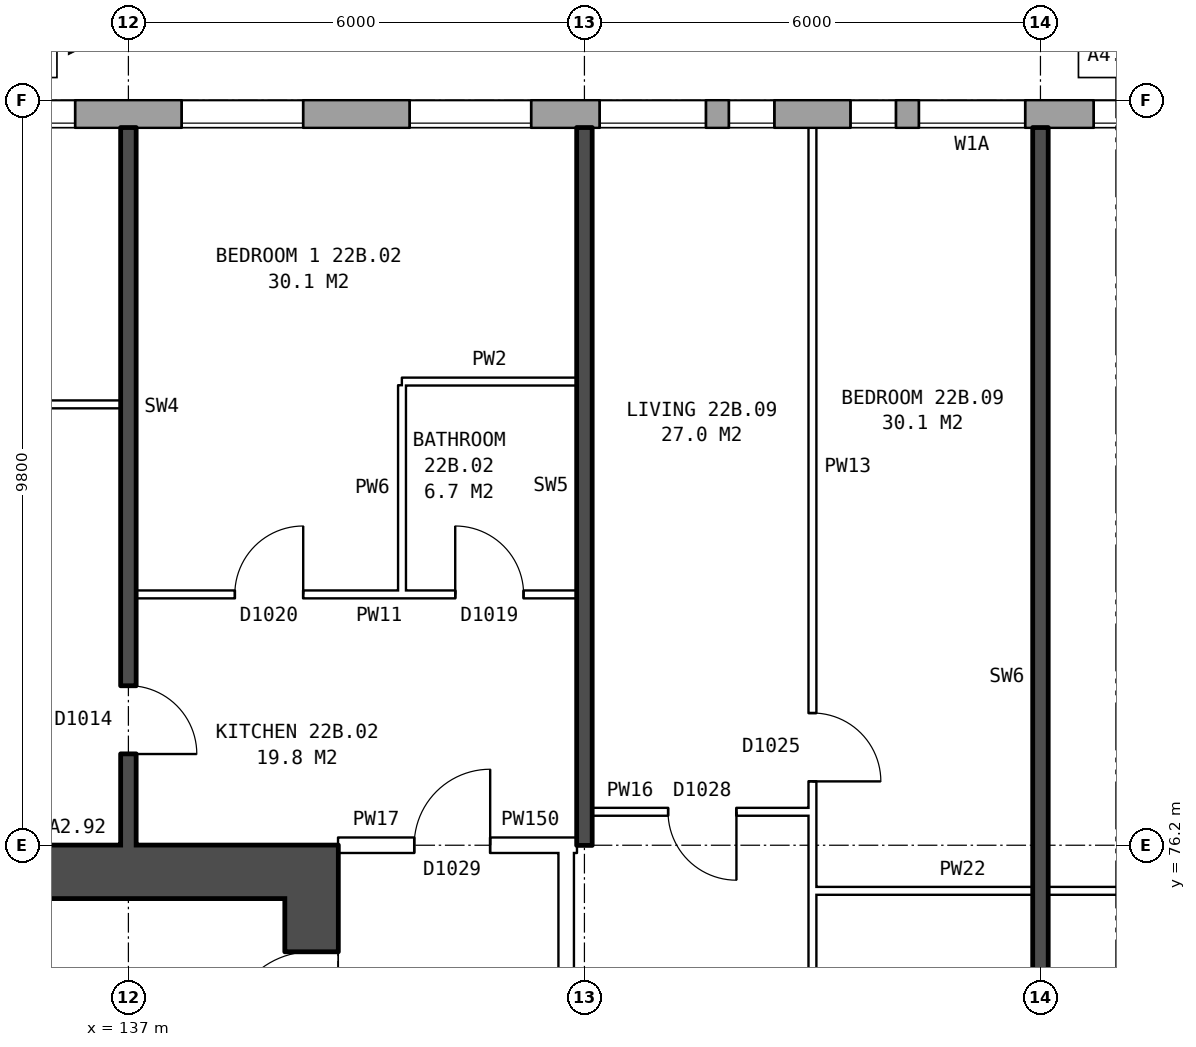
"""IFC4 building model, lengths in metres.
Left out: names, types, materials, properties, quantities, classifications, styles, units other than length and angle.
Written with IfcOpenShell. Run it as: python <this file> out.ifc"""

import sys

from ifc_helpers import new_model, si_unit, direction, frame, frame_2d, origin, place, context, subcontext, project, spatial, rectangle, extrude, element, fill, save


model = new_model("IFC4")
c1 = context("Model", 3, precision=1e-05, world=origin(), true_north=direction((0.0, 1.0)))
c2 = subcontext(c1, "Body", "Model", "MODEL_VIEW")
j1 = project(units=[si_unit("LENGTHUNIT", "METRE"), si_unit("PLANEANGLEUNIT", "RADIAN")], contexts=[c1])
p1 = place(None, origin())
s1 = spatial("IfcSite", under=j1, at=p1, CompositionType="ELEMENT")
p2 = place(p1, origin())
s2 = spatial("IfcBuilding", under=s1, at=p2, CompositionType="ELEMENT")
p3 = place(p2, frame((0.0, 0.0, 80.9)))
s3 = spatial("IfcBuildingStorey", under=s2, at=p3, CompositionType="ELEMENT", Elevation=80.9)
p4 = place(p3, frame((172.175, 85.82, 0.0), z_axis=(0.0, 0.0, 1.0), x_axis=(-1.0, 0.0, 0.0)))
e1 = element("IfcWall", 1, at=p4, inside=s3, PredefinedType="STANDARD", context=c2, shape_type="SweptSolid", body=[
    extrude(rectangle(XDim=38.101, YDim=0.36, at=frame_2d((19.05, 0.0))), origin(), (0.0, 0.0, 1.0), 2.85),
])
p5 = place(p4, frame((2.875, 0.0, 0.8)))
e2 = element("IfcOpeningElement", 2, at=p5, cuts=e1, PredefinedType="OPENING", context=c2, shape_type="SweptSolid", body=[
    extrude(rectangle(XDim=1.6, YDim=1.8, at=frame_2d((0.8, 0.9))), frame((0.0, 0.19, 0.0), z_axis=(0.0, -1.0, 0.0), x_axis=(1.0, 0.0, 0.0)), (0.0, 0.0, 1.0), 0.38),
])
p6 = place(p4, frame((5.875, 0.0, 0.8)))
e3 = element("IfcOpeningElement", 3, at=p6, cuts=e1, PredefinedType="OPENING", context=c2, shape_type="SweptSolid", body=[
    extrude(rectangle(XDim=1.6, YDim=1.8, at=frame_2d((0.8, 0.9))), frame((0.0, 0.19, 0.0), z_axis=(0.0, -1.0, 0.0), x_axis=(1.0, 0.0, 0.0)), (0.0, 0.0, 1.0), 0.38),
])
p7 = place(p4, frame((8.875, 0.0, 0.8)))
e4 = element("IfcOpeningElement", 4, at=p7, cuts=e1, PredefinedType="OPENING", context=c2, shape_type="SweptSolid", body=[
    extrude(rectangle(XDim=1.6, YDim=1.8, at=frame_2d((0.8, 0.9))), frame((0.0, 0.19, 0.0), z_axis=(0.0, -1.0, 0.0), x_axis=(1.0, 0.0, 0.0)), (0.0, 0.0, 1.0), 0.38),
])
p8 = place(p4, frame((12.575, 0.0, 0.8)))
e5 = element("IfcOpeningElement", 5, at=p8, cuts=e1, PredefinedType="OPENING", context=c2, shape_type="SweptSolid", body=[
    extrude(rectangle(XDim=0.6, YDim=0.9, at=frame_2d((0.3, 0.45))), frame((0.0, 0.19, 0.0), z_axis=(0.0, -1.0, 0.0), x_axis=(1.0, 0.0, 0.0)), (0.0, 0.0, 1.0), 0.38),
])
p9 = place(p4, frame((14.875, 0.0, 0.8)))
e6 = element("IfcOpeningElement", 6, at=p9, cuts=e1, PredefinedType="OPENING", context=c2, shape_type="SweptSolid", body=[
    extrude(rectangle(XDim=1.6, YDim=1.8, at=frame_2d((0.8, 0.9))), frame((0.0, 0.19, 0.0), z_axis=(0.0, -1.0, 0.0), x_axis=(1.0, 0.0, 0.0)), (0.0, 0.0, 1.0), 0.38),
])
p10 = place(p4, frame((17.875, 0.0, 0.8)))
e7 = element("IfcOpeningElement", 7, at=p10, cuts=e1, PredefinedType="OPENING", context=c2, shape_type="SweptSolid", body=[
    extrude(rectangle(XDim=1.6, YDim=1.8, at=frame_2d((0.8, 0.9))), frame((0.0, 0.19, 0.0), z_axis=(0.0, -1.0, 0.0), x_axis=(1.0, 0.0, 0.0)), (0.0, 0.0, 1.0), 0.38),
])
p11 = place(p4, frame((20.875, 0.0, 0.8)))
e8 = element("IfcOpeningElement", 8, at=p11, cuts=e1, PredefinedType="OPENING", context=c2, shape_type="SweptSolid", body=[
    extrude(rectangle(XDim=1.6, YDim=1.8, at=frame_2d((0.8, 0.9))), frame((0.0, 0.19, 0.0), z_axis=(0.0, -1.0, 0.0), x_axis=(1.0, 0.0, 0.0)), (0.0, 0.0, 1.0), 0.38),
])
p12 = place(p4, frame((23.375, 0.0, 0.65)))
e9 = element("IfcOpeningElement", 9, at=p12, cuts=e1, PredefinedType="OPENING", context=c2, shape_type="SweptSolid", body=[
    extrude(rectangle(XDim=1.4, YDim=1.8, at=frame_2d((0.7, 0.9))), frame((0.0, 0.19, 0.0), z_axis=(0.0, -1.0, 0.0), x_axis=(1.0, 0.0, 0.0)), (0.0, 0.0, 1.0), 0.38),
])
p13 = place(p4, frame((26.675, 0.0, 1.7)))
e10 = element("IfcOpeningElement", 10, at=p13, cuts=e1, PredefinedType="OPENING", context=c2, shape_type="SweptSolid", body=[
    extrude(rectangle(XDim=0.6, YDim=0.9, at=frame_2d((0.3, 0.45))), frame((0.0, 0.19, 0.0), z_axis=(0.0, -1.0, 0.0), x_axis=(1.0, 0.0, 0.0)), (0.0, 0.0, 1.0), 0.38),
])
p14 = place(p4, frame((29.875, 0.0, 0.8)))
e11 = element("IfcOpeningElement", 11, at=p14, cuts=e1, PredefinedType="OPENING", context=c2, shape_type="SweptSolid", body=[
    extrude(rectangle(XDim=1.6, YDim=1.8, at=frame_2d((0.8, 0.9))), frame((0.0, 0.19, 0.0), z_axis=(0.0, -1.0, 0.0), x_axis=(1.0, 0.0, 0.0)), (0.0, 0.0, 1.0), 0.38),
])
p15 = place(p4, frame((32.875, 0.0, 0.8)))
e12 = element("IfcOpeningElement", 12, at=p15, cuts=e1, PredefinedType="OPENING", context=c2, shape_type="SweptSolid", body=[
    extrude(rectangle(XDim=1.6, YDim=1.8, at=frame_2d((0.8, 0.9))), frame((0.0, 0.19, 0.0), z_axis=(0.0, -1.0, 0.0), x_axis=(1.0, 0.0, 0.0)), (0.0, 0.0, 1.0), 0.38),
])
p16 = place(p4, frame((35.875, 0.0, 0.8)))
e13 = element("IfcOpeningElement", 13, at=p16, cuts=e1, PredefinedType="OPENING", context=c2, shape_type="SweptSolid", body=[
    extrude(rectangle(XDim=1.6, YDim=1.8, at=frame_2d((0.8, 0.9))), frame((0.0, 0.19, 0.0), z_axis=(0.0, -1.0, 0.0), x_axis=(1.0, 0.0, 0.0)), (0.0, 0.0, 1.0), 0.38),
])
p17 = place(p4, frame((13.475, 0.0, 0.8)))
e14 = element("IfcOpeningElement", 14, at=p17, cuts=e1, PredefinedType="OPENING", context=c2, shape_type="SweptSolid", body=[
    extrude(rectangle(XDim=1.0, YDim=1.8, at=frame_2d((0.5, 0.9))), frame((0.0, 0.19, 0.0), z_axis=(0.0, -1.0, 0.0), x_axis=(1.0, 0.0, 0.0)), (0.0, 0.0, 1.0), 0.38),
])
p18 = place(p4, frame((25.075, 0.0, 0.55)))
e15 = element("IfcOpeningElement", 15, at=p18, cuts=e1, PredefinedType="OPENING", context=c2, shape_type="SweptSolid", body=[
    extrude(rectangle(XDim=0.6, YDim=0.9, at=frame_2d((0.3, 0.45))), frame((0.0, 0.19, 0.0), z_axis=(0.0, -1.0, 0.0), x_axis=(1.0, 0.0, 0.0)), (0.0, 0.0, 1.0), 0.38),
])
p19 = place(p4, frame((27.575, 0.0, 0.8)))
e16 = element("IfcOpeningElement", 16, at=p19, cuts=e1, PredefinedType="OPENING", context=c2, shape_type="SweptSolid", body=[
    extrude(rectangle(XDim=1.4, YDim=1.8, at=frame_2d((0.7, 0.9))), frame((0.0, 0.19, 0.0), z_axis=(0.0, -1.0, 0.0), x_axis=(1.0, 0.0, 0.0)), (0.0, 0.0, 1.0), 0.38),
])
p20 = place(p3, frame((139.41, 64.5, 0.0), z_axis=(0.0, 0.0, 1.0), x_axis=(0.0, 1.0, 0.0)))
e17 = element("IfcWall", 17, at=p20, inside=s3, PredefinedType="SHEAR", context=c2, shape_type="SweptSolid", body=[
    extrude(rectangle(XDim=11.0, YDim=0.7, at=frame_2d((5.5, 0.0))), origin(), (0.0, 0.0, 1.0), 2.85),
])
p21 = place(p20, frame((0.625, 0.0, 0.0)))
e18 = element("IfcOpeningElement", 18, at=p21, cuts=e17, PredefinedType="OPENING", context=c2, shape_type="SweptSolid", body=[
    extrude(rectangle(XDim=1.1, YDim=2.1, at=frame_2d((0.55, 1.05))), frame((0.0, 0.36, 0.0), z_axis=(0.0, -1.0, 0.0), x_axis=(1.0, 0.0, 0.0)), (0.0, 0.0, 1.0), 0.72),
])
p22 = place(p20, frame((9.2, 0.0, 0.0)))
e19 = element("IfcOpeningElement", 19, at=p22, cuts=e17, PredefinedType="OPENING", context=c2, shape_type="SweptSolid", body=[
    extrude(rectangle(XDim=1.1, YDim=2.1, at=frame_2d((0.55, 1.05))), frame((0.0, 0.36, 0.0), z_axis=(0.0, -1.0, 0.0), x_axis=(1.0, 0.0, 0.0)), (0.0, 0.0, 1.0), 0.72),
])
p23 = place(p20, frame((7.425, 0.0, 0.0)))
e20 = element("IfcOpeningElement", 20, at=p23, cuts=e17, PredefinedType="OPENING", context=c2, shape_type="SweptSolid", body=[
    extrude(rectangle(XDim=0.85, YDim=2.1, at=frame_2d((0.425, 1.05))), frame((0.0, 0.36, 0.0), z_axis=(0.0, -1.0, 0.0), x_axis=(1.0, 0.0, 0.0)), (0.0, 0.0, 1.0), 0.72),
])
p24 = place(p3, frame((139.76, 75.85, 0.0), z_axis=(0.0, 0.0, 1.0), x_axis=(-1.0, 0.0, 0.0)))
e21 = element("IfcWall", 21, at=p24, inside=s3, PredefinedType="SHEAR", context=c2, shape_type="SweptSolid", body=[
    extrude(rectangle(XDim=8.4, YDim=0.7, at=frame_2d((4.2, 0.0))), origin(), (0.0, 0.0, 1.0), 2.85),
])
p25 = place(p3, frame((142.76, 63.9, 0.0), z_axis=(0.0, 0.0, 1.0), x_axis=(0.0, 1.0, 0.0)))
e22 = element("IfcWall", 22, at=p25, inside=s3, PredefinedType="PARTITIONING", context=c2, shape_type="SweptSolid", body=[
    extrude(rectangle(XDim=12.2, YDim=0.2, at=frame_2d((6.1, 0.0))), origin(), (0.0, 0.0, 1.0), 2.85),
])
p26 = place(p25, frame((5.1, 0.0, 0.0)))
e23 = element("IfcOpeningElement", 23, at=p26, cuts=e22, PredefinedType="OPENING", context=c2, shape_type="SweptSolid", body=[
    extrude(rectangle(XDim=2.0, YDim=2.1, at=frame_2d((1.0, 1.05))), frame((0.0, 0.11, 0.0), z_axis=(0.0, -1.0, 0.0), x_axis=(1.0, 0.0, 0.0)), (0.0, 0.0, 1.0), 0.22),
])
p27 = place(p3, frame((146.0, 75.6, 0.0), z_axis=(0.0, 0.0, 1.0), x_axis=(1.0, 0.0, 0.0)))
e24 = element("IfcWall", 24, at=p27, inside=s3, PredefinedType="PARTITIONING", context=c2, shape_type="SweptSolid", body=[
    extrude(rectangle(XDim=6.0, YDim=0.1, at=frame_2d((3.0, 0.0))), origin(), (0.0, 0.0, 1.0), 2.85),
])
p28 = place(p3, frame((139.76, 76.2, 0.0), z_axis=(0.0, 0.0, 1.0), x_axis=(1.0, 0.0, 0.0)))
e25 = element("IfcWall", 25, at=p28, inside=s3, PredefinedType="PARTITIONING", context=c2, shape_type="SweptSolid", body=[
    extrude(rectangle(XDim=3.0, YDim=0.2, at=frame_2d((1.5, 0.0))), origin(), (0.0, 0.0, 1.0), 2.85),
])
p29 = place(p28, frame((1.0, 0.0, 0.0)))
e26 = element("IfcOpeningElement", 26, at=p29, cuts=e25, PredefinedType="OPENING", context=c2, shape_type="SweptSolid", body=[
    extrude(rectangle(XDim=1.0, YDim=2.1, at=frame_2d((0.5, 1.05))), frame((0.0, 0.11, 0.0), z_axis=(0.0, -1.0, 0.0), x_axis=(1.0, 0.0, 0.0)), (0.0, 0.0, 1.0), 0.22),
])
p30 = place(p3, frame((142.76, 76.2, 0.0), z_axis=(0.0, 0.0, 1.0), x_axis=(1.0, 0.0, 0.0)))
e27 = element("IfcWall", 27, at=p30, inside=s3, PredefinedType="PARTITIONING", context=c2, shape_type="SweptSolid", body=[
    extrude(rectangle(XDim=0.14, YDim=0.2, at=frame_2d((0.07, 0.0))), origin(), (0.0, 0.0, 1.0), 2.85),
])
p31 = place(p3, frame((143.1, 76.64, 0.0), z_axis=(0.0, 0.0, 1.0), x_axis=(1.0, 0.0, 0.0)))
e28 = element("IfcWall", 28, at=p31, inside=s3, PredefinedType="PARTITIONING", context=c2, shape_type="SweptSolid", body=[
    extrude(rectangle(XDim=2.9, YDim=0.1, at=frame_2d((1.45, 0.0))), origin(), (0.0, 0.0, 1.0), 2.85),
])
p32 = place(p31, frame((1.0, 0.0, 0.0)))
e29 = element("IfcOpeningElement", 29, at=p32, cuts=e28, PredefinedType="OPENING", context=c2, shape_type="SweptSolid", body=[
    extrude(rectangle(XDim=0.9, YDim=2.1, at=frame_2d((0.45, 1.05))), frame((0.0, 0.06, 0.0), z_axis=(0.0, -1.0, 0.0), x_axis=(1.0, 0.0, 0.0)), (0.0, 0.0, 1.0), 0.12),
])
p33 = place(p3, frame((137.1, 79.5, 0.0), z_axis=(0.0, 0.0, 1.0), x_axis=(1.0, 0.0, 0.0)))
e30 = element("IfcWall", 30, at=p33, inside=s3, PredefinedType="PARTITIONING", context=c2, shape_type="SweptSolid", body=[
    extrude(rectangle(XDim=5.8, YDim=0.1, at=frame_2d((2.9, 0.0))), origin(), (0.0, 0.0, 1.0), 2.85),
])
p34 = place(p33, frame((1.3, 0.0, 0.0)))
e31 = element("IfcOpeningElement", 31, at=p34, cuts=e30, PredefinedType="OPENING", context=c2, shape_type="SweptSolid", body=[
    extrude(rectangle(XDim=0.9, YDim=2.1, at=frame_2d((0.45, 1.05))), frame((0.0, 0.06, 0.0), z_axis=(0.0, -1.0, 0.0), x_axis=(1.0, 0.0, 0.0)), (0.0, 0.0, 1.0), 0.12),
])
p35 = place(p33, frame((4.2, 0.0, 0.0)))
e32 = element("IfcOpeningElement", 32, at=p35, cuts=e30, PredefinedType="OPENING", context=c2, shape_type="SweptSolid", body=[
    extrude(rectangle(XDim=0.9, YDim=2.1, at=frame_2d((0.45, 1.05))), frame((0.0, 0.06, 0.0), z_axis=(0.0, -1.0, 0.0), x_axis=(1.0, 0.0, 0.0)), (0.0, 0.0, 1.0), 0.12),
])
p36 = place(p3, frame((131.36, 82.0, 0.0), z_axis=(0.0, 0.0, 1.0), x_axis=(1.0, 0.0, 0.0)))
e33 = element("IfcWall", 33, at=p36, inside=s3, PredefinedType="PARTITIONING", context=c2, shape_type="SweptSolid", body=[
    extrude(rectangle(XDim=5.54, YDim=0.1, at=frame_2d((2.77, 0.0))), origin(), (0.0, 0.0, 1.0), 2.85),
])
p37 = place(p36, frame((2.32, 0.0, 0.0)))
e34 = element("IfcOpeningElement", 34, at=p37, cuts=e33, PredefinedType="OPENING", context=c2, shape_type="SweptSolid", body=[
    extrude(rectangle(XDim=0.9, YDim=2.1, at=frame_2d((0.45, 1.05))), frame((0.0, 0.06, 0.0), z_axis=(0.0, -1.0, 0.0), x_axis=(1.0, 0.0, 0.0)), (0.0, 0.0, 1.0), 0.12),
])
p38 = place(p3, frame((140.6, 82.3, 0.0), z_axis=(0.0, 0.0, 1.0), x_axis=(1.0, 0.0, 0.0)))
e35 = element("IfcWall", 35, at=p38, inside=s3, PredefinedType="PARTITIONING", context=c2, shape_type="SweptSolid", body=[
    extrude(rectangle(XDim=2.3, YDim=0.1, at=frame_2d((1.15, 0.0))), origin(), (0.0, 0.0, 1.0), 2.85),
])
p39 = place(p3, frame((137.0, 76.2, 0.0), z_axis=(0.0, 0.0, 1.0), x_axis=(0.0, 1.0, 0.0)))
e36 = element("IfcWall", 36, at=p39, inside=s3, PredefinedType="SOLIDWALL", context=c2, shape_type="SweptSolid", body=[
    extrude(rectangle(XDim=9.44, YDim=0.2, at=frame_2d((4.72, 0.0))), origin(), (0.0, 0.0, 1.0), 2.85),
])
p40 = place(p39, frame((1.2, 0.0, 0.0)))
e37 = element("IfcOpeningElement", 37, at=p40, cuts=e36, PredefinedType="OPENING", context=c2, shape_type="SweptSolid", body=[
    extrude(rectangle(XDim=0.9, YDim=2.1, at=frame_2d((0.45, 1.05))), frame((0.0, 0.11, 0.0), z_axis=(0.0, -1.0, 0.0), x_axis=(1.0, 0.0, 0.0)), (0.0, 0.0, 1.0), 0.22),
])
p41 = place(p3, frame((140.6, 79.55, 0.0), z_axis=(0.0, 0.0, 1.0), x_axis=(0.0, 1.0, 0.0)))
e38 = element("IfcWall", 38, at=p41, inside=s3, PredefinedType="PARTITIONING", context=c2, shape_type="SweptSolid", body=[
    extrude(rectangle(XDim=2.7, YDim=0.1, at=frame_2d((1.35, 0.0))), origin(), (0.0, 0.0, 1.0), 2.85),
])
p42 = place(p3, frame((143.0, 76.2, 0.0), z_axis=(0.0, 0.0, 1.0), x_axis=(0.0, 1.0, 0.0)))
e39 = element("IfcWall", 39, at=p42, inside=s3, PredefinedType="SOLIDWALL", context=c2, shape_type="SweptSolid", body=[
    extrude(rectangle(XDim=9.44, YDim=0.2, at=frame_2d((4.72, 0.0))), origin(), (0.0, 0.0, 1.0), 2.85),
])
p43 = place(p3, frame((146.0, 71.3, 0.0), z_axis=(0.0, 0.0, 1.0), x_axis=(0.0, 1.0, 0.0)))
e40 = element("IfcWall", 40, at=p43, inside=s3, PredefinedType="PARTITIONING", context=c2, shape_type="SweptSolid", body=[
    extrude(rectangle(XDim=14.34, YDim=0.1, at=frame_2d((7.17, 0.0))), origin(), (0.0, 0.0, 1.0), 2.85),
])
p44 = place(p43, frame((5.74, 0.0, 0.0)))
e41 = element("IfcOpeningElement", 41, at=p44, cuts=e40, PredefinedType="OPENING", context=c2, shape_type="SweptSolid", body=[
    extrude(rectangle(XDim=0.9, YDim=2.1, at=frame_2d((0.45, 1.05))), frame((0.0, 0.06, 0.0), z_axis=(0.0, -1.0, 0.0), x_axis=(1.0, 0.0, 0.0)), (0.0, 0.0, 1.0), 0.12),
])
p45 = place(p43, frame((0.4, 0.0, 0.0)))
e42 = element("IfcOpeningElement", 42, at=p45, cuts=e40, PredefinedType="OPENING", context=c2, shape_type="SweptSolid", body=[
    extrude(rectangle(XDim=0.9, YDim=2.1, at=frame_2d((0.45, 1.05))), frame((0.0, 0.06, 0.0), z_axis=(0.0, -1.0, 0.0), x_axis=(1.0, 0.0, 0.0)), (0.0, 0.0, 1.0), 0.12),
])
p46 = place(p3, frame((149.0, 71.2, 0.0), z_axis=(0.0, 0.0, 1.0), x_axis=(0.0, 1.0, 0.0)))
e43 = element("IfcWall", 43, at=p46, inside=s3, PredefinedType="SOLIDWALL", context=c2, shape_type="SweptSolid", body=[
    extrude(rectangle(XDim=14.44, YDim=0.2, at=frame_2d((7.22, 0.0))), origin(), (0.0, 0.0, 1.0), 2.85),
])
p47 = place(p11, origin())
e44 = element("IfcWindow", 44, at=p47, inside=s3, PartitioningType="SINGLE_PANEL", PredefinedType="WINDOW", context=c2, shape_type="SweptSolid", body=[
    extrude(rectangle(XDim=1.6, YDim=1.8, at=frame_2d((0.8, 0.9))), frame((0.0, 0.15, 0.0), z_axis=(0.0, -1.0, 0.0), x_axis=(1.0, 0.0, 0.0)), (0.0, 0.0, 1.0), 0.06),
])
fill(e8, e44)
p48 = place(p12, origin())
e45 = element("IfcWindow", 45, at=p48, inside=s3, PartitioningType="SINGLE_PANEL", PredefinedType="WINDOW", context=c2, shape_type="SweptSolid", body=[
    extrude(rectangle(XDim=1.4, YDim=1.8, at=frame_2d((0.7, 0.9))), frame((0.0, 0.15, 0.0), z_axis=(0.0, -1.0, 0.0), x_axis=(1.0, 0.0, 0.0)), (0.0, 0.0, 1.0), 0.06),
])
fill(e9, e45)
p49 = place(p13, origin())
e46 = element("IfcWindow", 46, at=p49, inside=s3, PartitioningType="SINGLE_PANEL", PredefinedType="WINDOW", context=c2, shape_type="SweptSolid", body=[
    extrude(rectangle(XDim=0.6, YDim=0.9, at=frame_2d((0.3, 0.45))), frame((0.0, 0.15, 0.0), z_axis=(0.0, -1.0, 0.0), x_axis=(1.0, 0.0, 0.0)), (0.0, 0.0, 1.0), 0.06),
])
fill(e10, e46)
p50 = place(p14, origin())
e47 = element("IfcWindow", 47, at=p50, inside=s3, PartitioningType="SINGLE_PANEL", PredefinedType="WINDOW", context=c2, shape_type="SweptSolid", body=[
    extrude(rectangle(XDim=1.6, YDim=1.8, at=frame_2d((0.8, 0.9))), frame((0.0, 0.15, 0.0), z_axis=(0.0, -1.0, 0.0), x_axis=(1.0, 0.0, 0.0)), (0.0, 0.0, 1.0), 0.06),
])
fill(e11, e47)
p51 = place(p15, origin())
e48 = element("IfcWindow", 48, at=p51, inside=s3, PartitioningType="SINGLE_PANEL", PredefinedType="WINDOW", context=c2, shape_type="SweptSolid", body=[
    extrude(rectangle(XDim=1.6, YDim=1.8, at=frame_2d((0.8, 0.9))), frame((0.0, 0.15, 0.0), z_axis=(0.0, -1.0, 0.0), x_axis=(1.0, 0.0, 0.0)), (0.0, 0.0, 1.0), 0.06),
])
fill(e12, e48)
p52 = place(p16, origin())
e49 = element("IfcWindow", 49, at=p52, inside=s3, PartitioningType="SINGLE_PANEL", PredefinedType="WINDOW", context=c2, shape_type="SweptSolid", body=[
    extrude(rectangle(XDim=1.6, YDim=1.8, at=frame_2d((0.8, 0.9))), frame((0.0, 0.15, 0.0), z_axis=(0.0, -1.0, 0.0), x_axis=(1.0, 0.0, 0.0)), (0.0, 0.0, 1.0), 0.06),
])
fill(e13, e49)
p53 = place(p22, origin())
e50 = element("IfcDoor", 50, at=p53, inside=s3, OperationType="SINGLE_SWING_LEFT", PredefinedType="DOOR", context=c2, shape_type="SweptSolid", body=[
    extrude(rectangle(XDim=1.1, YDim=2.1, at=frame_2d((0.55, 1.05))), frame((0.0, 0.335, 0.0), z_axis=(0.0, -1.0, 0.0), x_axis=(1.0, 0.0, 0.0)), (0.0, 0.0, 1.0), 0.05),
])
fill(e19, e50)
p54 = place(p34, origin())
e51 = element("IfcDoor", 51, at=p54, inside=s3, OperationType="SINGLE_SWING_RIGHT", PredefinedType="DOOR", context=c2, shape_type="SweptSolid", body=[
    extrude(rectangle(XDim=0.9, YDim=2.1, at=frame_2d((0.45, 1.05))), frame((0.0, 0.025, 0.0), z_axis=(0.0, -1.0, 0.0), x_axis=(1.0, 0.0, 0.0)), (0.0, 0.0, 1.0), 0.05),
])
fill(e31, e51)
p55 = place(p29, origin())
e52 = element("IfcDoor", 52, at=p55, inside=s3, OperationType="SINGLE_SWING_RIGHT", PredefinedType="DOOR", context=c2, shape_type="SweptSolid", body=[
    extrude(rectangle(XDim=1.0, YDim=2.1, at=frame_2d((0.5, 1.05))), frame((0.0, 0.025, 0.0), z_axis=(0.0, -1.0, 0.0), x_axis=(1.0, 0.0, 0.0)), (0.0, 0.0, 1.0), 0.05),
])
fill(e26, e52)
p56 = place(p40, frame((0.9, 0.0, 0.0), z_axis=(0.0, 0.0, 1.0), x_axis=(-1.0, 0.0, 0.0)))
e53 = element("IfcDoor", 53, at=p56, inside=s3, OperationType="SINGLE_SWING_RIGHT", PredefinedType="DOOR", context=c2, shape_type="SweptSolid", body=[
    extrude(rectangle(XDim=0.9, YDim=2.1, at=frame_2d((0.45, 1.05))), frame((0.0, 0.025, 0.0), z_axis=(0.0, -1.0, 0.0), x_axis=(1.0, 0.0, 0.0)), (0.0, 0.0, 1.0), 0.05),
])
fill(e37, e53)
p57 = place(p35, origin())
e54 = element("IfcDoor", 54, at=p57, inside=s3, OperationType="SINGLE_SWING_LEFT", PredefinedType="DOOR", context=c2, shape_type="SweptSolid", body=[
    extrude(rectangle(XDim=0.9, YDim=2.1, at=frame_2d((0.45, 1.05))), frame((0.0, 0.025, 0.0), z_axis=(0.0, -1.0, 0.0), x_axis=(1.0, 0.0, 0.0)), (0.0, 0.0, 1.0), 0.05),
])
fill(e32, e54)
p58 = place(p44, frame((0.9, 0.0, 0.0), z_axis=(0.0, 0.0, 1.0), x_axis=(-1.0, 0.0, 0.0)))
e55 = element("IfcDoor", 55, at=p58, inside=s3, OperationType="SINGLE_SWING_RIGHT", PredefinedType="DOOR", context=c2, shape_type="SweptSolid", body=[
    extrude(rectangle(XDim=0.9, YDim=2.1, at=frame_2d((0.45, 1.05))), frame((0.0, 0.025, 0.0), z_axis=(0.0, -1.0, 0.0), x_axis=(1.0, 0.0, 0.0)), (0.0, 0.0, 1.0), 0.05),
])
fill(e41, e55)
p59 = place(p32, frame((0.9, 0.0, 0.0), z_axis=(0.0, 0.0, 1.0), x_axis=(-1.0, 0.0, 0.0)))
e56 = element("IfcDoor", 56, at=p59, inside=s3, OperationType="SINGLE_SWING_LEFT", PredefinedType="DOOR", context=c2, shape_type="SweptSolid", body=[
    extrude(rectangle(XDim=0.9, YDim=2.1, at=frame_2d((0.45, 1.05))), frame((0.0, 0.025, 0.0), z_axis=(0.0, -1.0, 0.0), x_axis=(1.0, 0.0, 0.0)), (0.0, 0.0, 1.0), 0.05),
])
fill(e29, e56)
p60 = place(p18, origin())
e57 = element("IfcWindow", 57, at=p60, inside=s3, PartitioningType="SINGLE_PANEL", PredefinedType="WINDOW", context=c2, shape_type="SweptSolid", body=[
    extrude(rectangle(XDim=0.6, YDim=0.9, at=frame_2d((0.3, 0.45))), frame((0.0, 0.15, 0.0), z_axis=(0.0, -1.0, 0.0), x_axis=(1.0, 0.0, 0.0)), (0.0, 0.0, 1.0), 0.06),
])
fill(e15, e57)
p61 = place(p19, origin())
e58 = element("IfcWindow", 58, at=p61, inside=s3, PartitioningType="SINGLE_PANEL", PredefinedType="WINDOW", context=c2, shape_type="SweptSolid", body=[
    extrude(rectangle(XDim=1.4, YDim=1.8, at=frame_2d((0.7, 0.9))), frame((0.0, 0.15, 0.0), z_axis=(0.0, -1.0, 0.0), x_axis=(1.0, 0.0, 0.0)), (0.0, 0.0, 1.0), 0.06),
])
fill(e16, e58)
save(model, sys.argv[1])
